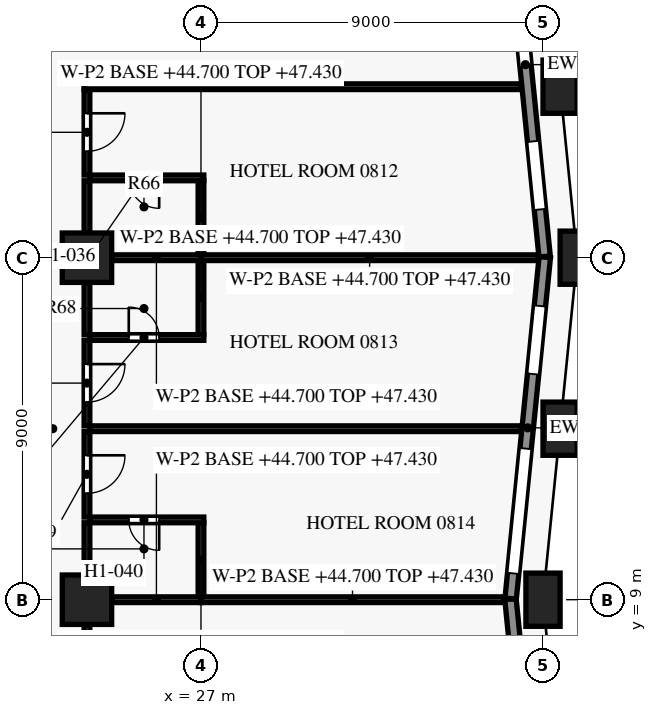
"""IFC4 building model, lengths in metres.
Left out: names, types, materials, properties, quantities, classifications, styles, units other than length and angle.
Written with IfcOpenShell. Run it as: python <this file> out.ifc"""

import sys

from ifc_helpers import new_model, si_unit, direction, frame, frame_2d, origin, origin_2d, place, context, subcontext, project, spatial, rectangle, extrude, element, fill, save


model = new_model("IFC4")
c1 = context("Model", 3, precision=1e-05, world=origin(), true_north=direction((0.0, 1.0)))
c2 = subcontext(c1, "Body", "Model", "MODEL_VIEW")
j1 = project(units=[si_unit("LENGTHUNIT", "METRE"), si_unit("PLANEANGLEUNIT", "RADIAN")], contexts=[c1])
p1 = place(None, origin())
s1 = spatial("IfcSite", under=j1, at=p1, CompositionType="ELEMENT")
p2 = place(p1, origin())
s2 = spatial("IfcBuilding", under=s1, at=p2, CompositionType="ELEMENT")
p3 = place(p2, frame((0.0, 0.0, 44.7)))
s3 = spatial("IfcBuildingStorey", under=s2, at=p3, CompositionType="ELEMENT", Elevation=44.7)
for number, where, z_axis, x_axis in (
    (1, (36.0, 9.0, 0.0), (0.0, 0.0, 1.0), (0.0, 1.0, 0.0)),
    (2, (36.45, 13.5, 0.0), (0.0, 0.0, 1.0), (0.1, 0.995, 0.0)),
    (3, (36.9, 18.0, 0.0), (0.0, 0.0, 1.0), (0.0, 1.0, 0.0)),
    (4, (36.45, 22.5, 0.0), (0.0, 0.0, 1.0), (-0.1, 0.995, 0.0)),
):
    element("IfcColumn", number, at=place(p3, frame(where, z_axis=z_axis, x_axis=x_axis)), inside=s3, PredefinedType="COLUMN", context=c2, shape_type="SweptSolid", body=[
        extrude(rectangle(XDim=0.9, YDim=1.4, at=origin_2d()), origin(), (0.0, 0.0, 1.0), 3.6),
    ])
for number, where, z_axis, x_axis in (
    (5, (24.0, 9.0, 0.0), (0.0, 0.0, 1.0), (1.0, 0.0, 0.0)),
    (6, (24.0, 18.0, 0.0), (0.0, 0.0, 1.0), (1.0, 0.0, 0.0)),
):
    element("IfcColumn", number, at=place(p3, frame(where, z_axis=z_axis, x_axis=x_axis)), inside=s3, PredefinedType="COLUMN", context=c2, shape_type="SweptSolid", body=[
        extrude(rectangle(XDim=1.3, YDim=1.3, at=origin_2d()), origin(), (0.0, 0.0, 1.0), 3.6),
    ])
p4 = place(p3, frame((35.144, 9.015, 0.0), z_axis=(0.0, 0.0, 1.0), x_axis=(0.099462600847, -0.995041301169, 0.0)))
e7 = element("IfcWall", 7, at=p4, inside=s3, PredefinedType="SOLIDWALL", context=c2, shape_type="SweptSolid", body=[
    extrude(rectangle(XDim=3.527, YDim=0.3, at=frame_2d((1.764, 0.0))), origin(), (0.0, 0.0, 1.0), 2.95),
])
p5 = place(p3, frame((36.047, 18.015, 0.0), z_axis=(0.0, 0.0, 1.0), x_axis=(-0.099522457379, -0.995035316196, 0.0)))
e8 = element("IfcWall", 8, at=p5, inside=s3, PredefinedType="SOLIDWALL", context=c2, shape_type="SweptSolid", body=[
    extrude(rectangle(XDim=9.03, YDim=0.3, at=frame_2d((4.515, 0.0))), origin(), (0.0, 0.0, 1.0), 2.95),
])
p6 = place(p5, frame((1.291, 0.0, 0.75)))
e9 = element("IfcOpeningElement", 9, at=p6, cuts=e8, PredefinedType="OPENING", context=c2, shape_type="SweptSolid", body=[
    extrude(rectangle(XDim=1.8, YDim=1.8, at=frame_2d((0.9, 0.9))), frame((0.0, 0.16, 0.0), z_axis=(0.0, -1.0, 0.0), x_axis=(1.0, 0.0, 0.0)), (0.0, 0.0, 1.0), 0.32),
])
p7 = place(p5, frame((5.064, 0.0, 0.15)))
e10 = element("IfcOpeningElement", 10, at=p7, cuts=e8, PredefinedType="OPENING", context=c2, shape_type="SweptSolid", body=[
    extrude(rectangle(XDim=3.3, YDim=2.4, at=frame_2d((1.65, 1.2))), frame((0.0, 0.16, 0.0), z_axis=(0.0, -1.0, 0.0), x_axis=(1.0, 0.0, 0.0)), (0.0, 0.0, 1.0), 0.32),
])
p8 = place(p3, frame((35.033, 28.132, 0.0), z_axis=(0.0, 0.0, 1.0), x_axis=(0.099487051997, -0.995038856771, 0.0)))
e11 = element("IfcWall", 11, at=p8, inside=s3, PredefinedType="SOLIDWALL", context=c2, shape_type="SweptSolid", body=[
    extrude(rectangle(XDim=10.152, YDim=0.3, at=frame_2d((5.076, 0.0))), origin(), (0.0, 0.0, 1.0), 2.95),
])
p9 = place(p8, frame((1.833, 0.0, 0.15)))
e12 = element("IfcOpeningElement", 12, at=p9, cuts=e11, PredefinedType="OPENING", context=c2, shape_type="SweptSolid", body=[
    extrude(rectangle(XDim=3.3, YDim=2.4, at=frame_2d((1.65, 1.2))), frame((0.0, 0.16, 0.0), z_axis=(0.0, -1.0, 0.0), x_axis=(1.0, 0.0, 0.0)), (0.0, 0.0, 1.0), 0.32),
])
p10 = place(p8, frame((7.106, 0.0, 0.75)))
e13 = element("IfcOpeningElement", 13, at=p10, cuts=e11, PredefinedType="OPENING", context=c2, shape_type="SweptSolid", body=[
    extrude(rectangle(XDim=1.8, YDim=1.8, at=frame_2d((0.9, 0.9))), frame((0.0, 0.16, 0.0), z_axis=(0.0, -1.0, 0.0), x_axis=(1.0, 0.0, 0.0)), (0.0, 0.0, 1.0), 0.32),
])
p11 = place(p3, frame((24.0, 8.345, 0.0), z_axis=(0.0, 0.0, 1.0), x_axis=(0.0, -1.0, 0.0)))
e14 = element("IfcWall", 14, at=p11, inside=s3, PredefinedType="PARTITIONING", context=c2, shape_type="SweptSolid", body=[
    extrude(rectangle(XDim=1.07, YDim=0.15, at=frame_2d((0.535, 0.0))), origin(), (0.0, 0.0, 1.0), 2.58),
])
p12 = place(p3, frame((27.0, 9.0, 0.0), z_axis=(0.0, 0.0, 1.0), x_axis=(-1.0, 0.0, 0.0)))
e15 = element("IfcWall", 15, at=p12, inside=s3, PredefinedType="PARTITIONING", context=c2, shape_type="SweptSolid", body=[
    extrude(rectangle(XDim=2.345, YDim=0.15, at=frame_2d((1.172, 0.0))), origin(), (0.0, 0.0, 1.0), 2.73),
])
p13 = place(p3, frame((34.975, 9.0, 0.0), z_axis=(0.0, 0.0, 1.0), x_axis=(-1.0, 0.0, 0.0)))
e16 = element("IfcWall", 16, at=p13, inside=s3, PredefinedType="PARTITIONING", context=c2, shape_type="SweptSolid", body=[
    extrude(rectangle(XDim=7.975, YDim=0.15, at=frame_2d((3.988, 0.0))), origin(), (0.0, 0.0, 1.0), 2.73),
])
p14 = place(p3, frame((27.0, 9.075, 0.0), z_axis=(0.0, 0.0, 1.0), x_axis=(0.0, 1.0, 0.0)))
e17 = element("IfcWall", 17, at=p14, inside=s3, PredefinedType="PARTITIONING", context=c2, shape_type="SweptSolid", body=[
    extrude(rectangle(XDim=1.95, YDim=0.15, at=frame_2d((0.975, 0.0))), origin(), (0.0, 0.0, 1.0), 2.73),
])
p15 = place(p3, frame((24.0, 11.025, 0.0), z_axis=(0.0, 0.0, 1.0), x_axis=(0.0, -1.0, 0.0)))
e18 = element("IfcWall", 18, at=p15, inside=s3, PredefinedType="PARTITIONING", context=c2, shape_type="SweptSolid", body=[
    extrude(rectangle(XDim=1.37, YDim=0.15, at=frame_2d((0.685, 0.0))), origin(), (0.0, 0.0, 1.0), 2.58),
])
p16 = place(p3, frame((27.075, 11.1, 0.0), z_axis=(0.0, 0.0, 1.0), x_axis=(-1.0, 0.0, 0.0)))
e19 = element("IfcWall", 19, at=p16, inside=s3, PredefinedType="PARTITIONING", context=c2, shape_type="SweptSolid", body=[
    extrude(rectangle(XDim=3.0, YDim=0.15, at=frame_2d((1.5, 0.0))), origin(), (0.0, 0.0, 1.0), 2.58),
])
p17 = place(p16, frame((1.175, 0.0, 0.0)))
e20 = element("IfcOpeningElement", 20, at=p17, cuts=e19, PredefinedType="OPENING", context=c2, shape_type="SweptSolid", body=[
    extrude(rectangle(XDim=0.8, YDim=2.1, at=frame_2d((0.4, 1.05))), frame((0.0, 0.085, 0.0), z_axis=(0.0, -1.0, 0.0), x_axis=(1.0, 0.0, 0.0)), (0.0, 0.0, 1.0), 0.17),
])
p18 = place(p3, frame((24.0, 13.425, 0.0), z_axis=(0.0, 0.0, 1.0), x_axis=(0.0, -1.0, 0.0)))
e21 = element("IfcWall", 21, at=p18, inside=s3, PredefinedType="PARTITIONING", context=c2, shape_type="SweptSolid", body=[
    extrude(rectangle(XDim=2.25, YDim=0.15, at=frame_2d((1.125, 0.0))), origin(), (0.0, 0.0, 1.0), 2.58),
])
p19 = place(p18, frame((0.625, 0.0, 0.0)))
e22 = element("IfcOpeningElement", 22, at=p19, cuts=e21, PredefinedType="OPENING", context=c2, shape_type="SweptSolid", body=[
    extrude(rectangle(XDim=1.0, YDim=2.1, at=frame_2d((0.5, 1.05))), frame((0.0, 0.085, 0.0), z_axis=(0.0, -1.0, 0.0), x_axis=(1.0, 0.0, 0.0)), (0.0, 0.0, 1.0), 0.17),
])
p20 = place(p3, frame((35.425, 13.5, 0.0), z_axis=(0.0, 0.0, 1.0), x_axis=(-1.0, 0.0, 0.0)))
e23 = element("IfcWall", 23, at=p20, inside=s3, PredefinedType="PARTITIONING", context=c2, shape_type="SweptSolid", body=[
    extrude(rectangle(XDim=11.35, YDim=0.15, at=frame_2d((5.675, 0.0))), origin(), (0.0, 0.0, 1.0), 2.58),
])
p21 = place(p3, frame((24.0, 15.825, 0.0), z_axis=(0.0, 0.0, 1.0), x_axis=(0.0, -1.0, 0.0)))
e24 = element("IfcWall", 24, at=p21, inside=s3, PredefinedType="PARTITIONING", context=c2, shape_type="SweptSolid", body=[
    extrude(rectangle(XDim=2.25, YDim=0.15, at=frame_2d((1.125, 0.0))), origin(), (0.0, 0.0, 1.0), 2.58),
])
p22 = place(p21, frame((0.625, 0.0, 0.0)))
e25 = element("IfcOpeningElement", 25, at=p22, cuts=e24, PredefinedType="OPENING", context=c2, shape_type="SweptSolid", body=[
    extrude(rectangle(XDim=1.0, YDim=2.1, at=frame_2d((0.5, 1.05))), frame((0.0, 0.085, 0.0), z_axis=(0.0, -1.0, 0.0), x_axis=(1.0, 0.0, 0.0)), (0.0, 0.0, 1.0), 0.17),
])
p23 = place(p3, frame((24.075, 15.9, 0.0), z_axis=(0.0, 0.0, 1.0), x_axis=(1.0, 0.0, 0.0)))
e26 = element("IfcWall", 26, at=p23, inside=s3, PredefinedType="PARTITIONING", context=c2, shape_type="SweptSolid", body=[
    extrude(rectangle(XDim=3.0, YDim=0.15, at=frame_2d((1.5, 0.0))), origin(), (0.0, 0.0, 1.0), 2.58),
])
p24 = place(p23, frame((1.025, 0.0, 0.0)))
e27 = element("IfcOpeningElement", 27, at=p24, cuts=e26, PredefinedType="OPENING", context=c2, shape_type="SweptSolid", body=[
    extrude(rectangle(XDim=0.8, YDim=2.1, at=frame_2d((0.4, 1.05))), frame((0.0, 0.085, 0.0), z_axis=(0.0, -1.0, 0.0), x_axis=(1.0, 0.0, 0.0)), (0.0, 0.0, 1.0), 0.17),
])
p25 = place(p3, frame((27.0, 15.975, 0.0), z_axis=(0.0, 0.0, 1.0), x_axis=(0.0, 1.0, 0.0)))
e28 = element("IfcWall", 28, at=p25, inside=s3, PredefinedType="PARTITIONING", context=c2, shape_type="SweptSolid", body=[
    extrude(rectangle(XDim=1.95, YDim=0.15, at=frame_2d((0.975, 0.0))), origin(), (0.0, 0.0, 1.0), 2.73),
])
p26 = place(p3, frame((24.0, 17.345, 0.0), z_axis=(0.0, 0.0, 1.0), x_axis=(0.0, -1.0, 0.0)))
e29 = element("IfcWall", 29, at=p26, inside=s3, PredefinedType="PARTITIONING", context=c2, shape_type="SweptSolid", body=[
    extrude(rectangle(XDim=1.37, YDim=0.15, at=frame_2d((0.685, 0.0))), origin(), (0.0, 0.0, 1.0), 2.58),
])
p27 = place(p3, frame((23.33, 18.0, 0.0), z_axis=(0.0, 0.0, 1.0), x_axis=(-1.0, 0.0, 0.0)))
e30 = element("IfcWall", 30, at=p27, inside=s3, PredefinedType="PARTITIONING", context=c2, shape_type="SweptSolid", body=[
    extrude(rectangle(XDim=5.43, YDim=0.1, at=frame_2d((2.715, 0.0))), origin(), (0.0, 0.0, 1.0), 2.73),
])
p28 = place(p3, frame((27.0, 18.0, 0.0), z_axis=(0.0, 0.0, 1.0), x_axis=(-1.0, 0.0, 0.0)))
e31 = element("IfcWall", 31, at=p28, inside=s3, PredefinedType="PARTITIONING", context=c2, shape_type="SweptSolid", body=[
    extrude(rectangle(XDim=2.345, YDim=0.15, at=frame_2d((1.172, 0.0))), origin(), (0.0, 0.0, 1.0), 2.73),
])
p29 = place(p3, frame((35.875, 18.0, 0.0), z_axis=(0.0, 0.0, 1.0), x_axis=(-1.0, 0.0, 0.0)))
e32 = element("IfcWall", 32, at=p29, inside=s3, PredefinedType="PARTITIONING", context=c2, shape_type="SweptSolid", body=[
    extrude(rectangle(XDim=8.875, YDim=0.15, at=frame_2d((4.438, 0.0))), origin(), (0.0, 0.0, 1.0), 2.73),
])
p30 = place(p3, frame((27.0, 18.075, 0.0), z_axis=(0.0, 0.0, 1.0), x_axis=(0.0, 1.0, 0.0)))
e33 = element("IfcWall", 33, at=p30, inside=s3, PredefinedType="PARTITIONING", context=c2, shape_type="SweptSolid", body=[
    extrude(rectangle(XDim=1.95, YDim=0.15, at=frame_2d((0.975, 0.0))), origin(), (0.0, 0.0, 1.0), 2.73),
])
p31 = place(p3, frame((24.0, 20.025, 0.0), z_axis=(0.0, 0.0, 1.0), x_axis=(0.0, -1.0, 0.0)))
e34 = element("IfcWall", 34, at=p31, inside=s3, PredefinedType="PARTITIONING", context=c2, shape_type="SweptSolid", body=[
    extrude(rectangle(XDim=1.37, YDim=0.15, at=frame_2d((0.685, 0.0))), origin(), (0.0, 0.0, 1.0), 2.58),
])
p32 = place(p3, frame((27.075, 20.1, 0.0), z_axis=(0.0, 0.0, 1.0), x_axis=(-1.0, 0.0, 0.0)))
e35 = element("IfcWall", 35, at=p32, inside=s3, PredefinedType="PARTITIONING", context=c2, shape_type="SweptSolid", body=[
    extrude(rectangle(XDim=3.0, YDim=0.15, at=frame_2d((1.5, 0.0))), origin(), (0.0, 0.0, 1.0), 2.58),
])
p33 = place(p32, frame((1.175, 0.0, 0.0)))
e36 = element("IfcOpeningElement", 36, at=p33, cuts=e35, PredefinedType="OPENING", context=c2, shape_type="SweptSolid", body=[
    extrude(rectangle(XDim=0.8, YDim=2.1, at=frame_2d((0.4, 1.05))), frame((0.0, 0.085, 0.0), z_axis=(0.0, -1.0, 0.0), x_axis=(1.0, 0.0, 0.0)), (0.0, 0.0, 1.0), 0.17),
])
p34 = place(p3, frame((24.0, 22.425, 0.0), z_axis=(0.0, 0.0, 1.0), x_axis=(0.0, -1.0, 0.0)))
e37 = element("IfcWall", 37, at=p34, inside=s3, PredefinedType="PARTITIONING", context=c2, shape_type="SweptSolid", body=[
    extrude(rectangle(XDim=2.25, YDim=0.15, at=frame_2d((1.125, 0.0))), origin(), (0.0, 0.0, 1.0), 2.58),
])
p35 = place(p34, frame((0.625, 0.0, 0.0)))
e38 = element("IfcOpeningElement", 38, at=p35, cuts=e37, PredefinedType="OPENING", context=c2, shape_type="SweptSolid", body=[
    extrude(rectangle(XDim=1.0, YDim=2.1, at=frame_2d((0.5, 1.05))), frame((0.0, 0.085, 0.0), z_axis=(0.0, -1.0, 0.0), x_axis=(1.0, 0.0, 0.0)), (0.0, 0.0, 1.0), 0.17),
])
p36 = place(p3, frame((35.425, 22.5, 0.0), z_axis=(0.0, 0.0, 1.0), x_axis=(-1.0, 0.0, 0.0)))
e39 = element("IfcWall", 39, at=p36, inside=s3, PredefinedType="PARTITIONING", context=c2, shape_type="SweptSolid", body=[
    extrude(rectangle(XDim=11.5, YDim=0.15, at=frame_2d((5.75, 0.0))), origin(), (0.0, 0.0, 1.0), 2.58),
])
p37 = place(p6, origin())
e40 = element("IfcWindow", 40, at=p37, inside=s3, PartitioningType="SINGLE_PANEL", PredefinedType="WINDOW", context=c2, shape_type="SweptSolid", body=[
    extrude(rectangle(XDim=1.8, YDim=1.8, at=frame_2d((0.9, 0.9))), frame((0.0, 0.03, 0.0), z_axis=(0.0, -1.0, 0.0), x_axis=(1.0, 0.0, 0.0)), (0.0, 0.0, 1.0), 0.06),
])
fill(e9, e40)
p38 = place(p7, origin())
e41 = element("IfcWindow", 41, at=p38, inside=s3, PartitioningType="SINGLE_PANEL", PredefinedType="WINDOW", context=c2, shape_type="SweptSolid", body=[
    extrude(rectangle(XDim=3.3, YDim=2.4, at=frame_2d((1.65, 1.2))), frame((0.0, 0.03, 0.0), z_axis=(0.0, -1.0, 0.0), x_axis=(1.0, 0.0, 0.0)), (0.0, 0.0, 1.0), 0.06),
])
fill(e10, e41)
p39 = place(p9, origin())
e42 = element("IfcWindow", 42, at=p39, inside=s3, PartitioningType="SINGLE_PANEL", PredefinedType="WINDOW", context=c2, shape_type="SweptSolid", body=[
    extrude(rectangle(XDim=3.3, YDim=2.4, at=frame_2d((1.65, 1.2))), frame((0.0, 0.03, 0.0), z_axis=(0.0, -1.0, 0.0), x_axis=(1.0, 0.0, 0.0)), (0.0, 0.0, 1.0), 0.06),
])
fill(e12, e42)
p40 = place(p10, origin())
e43 = element("IfcWindow", 43, at=p40, inside=s3, PartitioningType="SINGLE_PANEL", PredefinedType="WINDOW", context=c2, shape_type="SweptSolid", body=[
    extrude(rectangle(XDim=1.8, YDim=1.8, at=frame_2d((0.9, 0.9))), frame((0.0, 0.03, 0.0), z_axis=(0.0, -1.0, 0.0), x_axis=(1.0, 0.0, 0.0)), (0.0, 0.0, 1.0), 0.06),
])
fill(e13, e43)
p41 = place(p35, origin())
e44 = element("IfcDoor", 44, at=p41, inside=s3, OperationType="SINGLE_SWING_LEFT", PredefinedType="DOOR", context=c2, shape_type="SweptSolid", body=[
    extrude(rectangle(XDim=1.0, YDim=2.1, at=frame_2d((0.5, 1.05))), frame((0.0, 0.025, 0.0), z_axis=(0.0, -1.0, 0.0), x_axis=(1.0, 0.0, 0.0)), (0.0, 0.0, 1.0), 0.05),
])
fill(e38, e44)
p42 = place(p33, origin())
e45 = element("IfcDoor", 45, at=p42, inside=s3, OperationType="SINGLE_SWING_LEFT", PredefinedType="DOOR", context=c2, shape_type="SweptSolid", body=[
    extrude(rectangle(XDim=0.8, YDim=2.1, at=frame_2d((0.4, 1.05))), frame((0.0, 0.025, 0.0), z_axis=(0.0, -1.0, 0.0), x_axis=(1.0, 0.0, 0.0)), (0.0, 0.0, 1.0), 0.05),
])
fill(e36, e45)
p43 = place(p22, origin())
e46 = element("IfcDoor", 46, at=p43, inside=s3, OperationType="SINGLE_SWING_LEFT", PredefinedType="DOOR", context=c2, shape_type="SweptSolid", body=[
    extrude(rectangle(XDim=1.0, YDim=2.1, at=frame_2d((0.5, 1.05))), frame((0.0, 0.025, 0.0), z_axis=(0.0, -1.0, 0.0), x_axis=(1.0, 0.0, 0.0)), (0.0, 0.0, 1.0), 0.05),
])
fill(e25, e46)
p44 = place(p24, origin())
e47 = element("IfcDoor", 47, at=p44, inside=s3, OperationType="SINGLE_SWING_LEFT", PredefinedType="DOOR", context=c2, shape_type="SweptSolid", body=[
    extrude(rectangle(XDim=0.8, YDim=2.1, at=frame_2d((0.4, 1.05))), frame((0.0, 0.025, 0.0), z_axis=(0.0, -1.0, 0.0), x_axis=(1.0, 0.0, 0.0)), (0.0, 0.0, 1.0), 0.05),
])
fill(e27, e47)
p45 = place(p19, origin())
e48 = element("IfcDoor", 48, at=p45, inside=s3, OperationType="SINGLE_SWING_LEFT", PredefinedType="DOOR", context=c2, shape_type="SweptSolid", body=[
    extrude(rectangle(XDim=1.0, YDim=2.1, at=frame_2d((0.5, 1.05))), frame((0.0, 0.025, 0.0), z_axis=(0.0, -1.0, 0.0), x_axis=(1.0, 0.0, 0.0)), (0.0, 0.0, 1.0), 0.05),
])
fill(e22, e48)
p46 = place(p17, origin())
e49 = element("IfcDoor", 49, at=p46, inside=s3, OperationType="SINGLE_SWING_LEFT", PredefinedType="DOOR", context=c2, shape_type="SweptSolid", body=[
    extrude(rectangle(XDim=0.8, YDim=2.1, at=frame_2d((0.4, 1.05))), frame((0.0, 0.025, 0.0), z_axis=(0.0, -1.0, 0.0), x_axis=(1.0, 0.0, 0.0)), (0.0, 0.0, 1.0), 0.05),
])
fill(e20, e49)
save(model, sys.argv[1])
